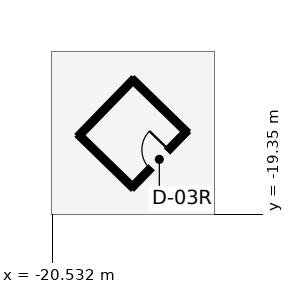
"""IFC4 building model, lengths in metres.
Left out: names, types, materials, properties, quantities, classifications, styles, units other than length and angle.
Written with IfcOpenShell. Run it as: python <this file> out.ifc"""

import sys

from ifc_helpers import new_model, si_unit, direction, frame, frame_2d, origin, place, context, subcontext, project, spatial, rectangle, extrude, element, fill, save


model = new_model("IFC4")
c1 = context("Model", 3, precision=1e-05, world=origin(), true_north=direction((0.0, 1.0)))
c2 = subcontext(c1, "Body", "Model", "MODEL_VIEW")
j1 = project(units=[si_unit("LENGTHUNIT", "METRE"), si_unit("PLANEANGLEUNIT", "RADIAN")], contexts=[c1])
p1 = place(None, origin())
s1 = spatial("IfcSite", under=j1, at=p1, CompositionType="ELEMENT")
p2 = place(p1, origin())
s2 = spatial("IfcBuilding", under=s1, at=p2, CompositionType="ELEMENT")
p3 = place(p2, frame((0.0, 0.0, 152.7)))
s3 = spatial("IfcBuildingStorey", under=s2, at=p3, CompositionType="ELEMENT", Elevation=152.7)
p4 = place(p3, frame((35.296, -9.873, 0.0), z_axis=(0.0, 0.0, 1.0), x_axis=(-0.933580612554, -0.35836746485, 0.0)))
e1 = element("IfcWall", 1, at=p4, inside=s3, PredefinedType="STANDARD", context=c2, shape_type="SweptSolid", body=[
    extrude(rectangle(XDim=58.828, YDim=0.3, at=frame_2d((29.414, 0.0))), origin(), (0.0, 0.0, 1.0), 3.85),
])
p5 = place(p4, frame((6.314, 0.0, 0.85)))
e2 = element("IfcOpeningElement", 2, at=p5, cuts=e1, PredefinedType="OPENING", context=c2, shape_type="SweptSolid", body=[
    extrude(rectangle(XDim=1.4, YDim=2.2, at=frame_2d((0.7, 1.1))), frame((0.0, 0.16, 0.0), z_axis=(0.0, -1.0, 0.0), x_axis=(1.0, 0.0, 0.0)), (0.0, 0.0, 1.0), 0.32),
])
p6 = place(p4, frame((11.914, 0.0, 0.85)))
e3 = element("IfcOpeningElement", 3, at=p6, cuts=e1, PredefinedType="OPENING", context=c2, shape_type="SweptSolid", body=[
    extrude(rectangle(XDim=1.4, YDim=2.2, at=frame_2d((0.7, 1.1))), frame((0.0, 0.16, 0.0), z_axis=(0.0, -1.0, 0.0), x_axis=(1.0, 0.0, 0.0)), (0.0, 0.0, 1.0), 0.32),
])
p7 = place(p4, frame((23.114, 0.0, 0.85)))
e4 = element("IfcOpeningElement", 4, at=p7, cuts=e1, PredefinedType="OPENING", context=c2, shape_type="SweptSolid", body=[
    extrude(rectangle(XDim=1.4, YDim=2.2, at=frame_2d((0.7, 1.1))), frame((0.0, 0.16, 0.0), z_axis=(0.0, -1.0, 0.0), x_axis=(1.0, 0.0, 0.0)), (0.0, 0.0, 1.0), 0.32),
])
p8 = place(p4, frame((28.714, 0.0, 0.85)))
e5 = element("IfcOpeningElement", 5, at=p8, cuts=e1, PredefinedType="OPENING", context=c2, shape_type="SweptSolid", body=[
    extrude(rectangle(XDim=1.4, YDim=2.2, at=frame_2d((0.7, 1.1))), frame((0.0, 0.16, 0.0), z_axis=(0.0, -1.0, 0.0), x_axis=(1.0, 0.0, 0.0)), (0.0, 0.0, 1.0), 0.32),
])
p9 = place(p4, frame((34.314, 0.0, 0.85)))
e6 = element("IfcOpeningElement", 6, at=p9, cuts=e1, PredefinedType="OPENING", context=c2, shape_type="SweptSolid", body=[
    extrude(rectangle(XDim=1.4, YDim=2.2, at=frame_2d((0.7, 1.1))), frame((0.0, 0.16, 0.0), z_axis=(0.0, -1.0, 0.0), x_axis=(1.0, 0.0, 0.0)), (0.0, 0.0, 1.0), 0.32),
])
p10 = place(p4, frame((45.514, 0.0, 0.85)))
e7 = element("IfcOpeningElement", 7, at=p10, cuts=e1, PredefinedType="OPENING", context=c2, shape_type="SweptSolid", body=[
    extrude(rectangle(XDim=1.4, YDim=2.2, at=frame_2d((0.7, 1.1))), frame((0.0, 0.16, 0.0), z_axis=(0.0, -1.0, 0.0), x_axis=(1.0, 0.0, 0.0)), (0.0, 0.0, 1.0), 0.32),
])
p11 = place(p4, frame((51.114, 0.0, 0.85)))
e8 = element("IfcOpeningElement", 8, at=p11, cuts=e1, PredefinedType="OPENING", context=c2, shape_type="SweptSolid", body=[
    extrude(rectangle(XDim=1.4, YDim=2.2, at=frame_2d((0.7, 1.1))), frame((0.0, 0.16, 0.0), z_axis=(0.0, -1.0, 0.0), x_axis=(1.0, 0.0, 0.0)), (0.0, 0.0, 1.0), 0.32),
])
p12 = place(p3, frame((-26.15, -25.64, 0.0), z_axis=(0.0, 0.0, 1.0), x_axis=(0.161975761987, 0.986794736776, 0.0)))
e9 = element("IfcWall", 9, at=p12, inside=s3, PredefinedType="STANDARD", context=c2, shape_type="SweptSolid", body=[
    extrude(rectangle(XDim=58.093, YDim=0.3, at=frame_2d((29.046, 0.0))), origin(), (0.0, 0.0, 1.0), 3.85),
])
p13 = place(p12, frame((28.546, 0.0, 0.0)))
e10 = element("IfcOpeningElement", 10, at=p13, cuts=e9, PredefinedType="OPENING", context=c2, shape_type="SweptSolid", body=[
    extrude(rectangle(XDim=1.0, YDim=2.15, at=frame_2d((0.5, 1.075))), frame((0.0, 0.16, 0.0), z_axis=(0.0, -1.0, 0.0), x_axis=(1.0, 0.0, 0.0)), (0.0, 0.0, 1.0), 0.32),
])
p14 = place(p12, frame((5.947, 0.0, 0.85)))
e11 = element("IfcOpeningElement", 11, at=p14, cuts=e9, PredefinedType="OPENING", context=c2, shape_type="SweptSolid", body=[
    extrude(rectangle(XDim=1.4, YDim=2.2, at=frame_2d((0.7, 1.1))), frame((0.0, 0.16, 0.0), z_axis=(0.0, -1.0, 0.0), x_axis=(1.0, 0.0, 0.0)), (0.0, 0.0, 1.0), 0.32),
])
p15 = place(p12, frame((11.546, 0.0, 0.85)))
e12 = element("IfcOpeningElement", 12, at=p15, cuts=e9, PredefinedType="OPENING", context=c2, shape_type="SweptSolid", body=[
    extrude(rectangle(XDim=1.4, YDim=2.2, at=frame_2d((0.7, 1.1))), frame((0.0, 0.16, 0.0), z_axis=(0.0, -1.0, 0.0), x_axis=(1.0, 0.0, 0.0)), (0.0, 0.0, 1.0), 0.32),
])
p16 = place(p12, frame((22.747, 0.0, 0.85)))
e13 = element("IfcOpeningElement", 13, at=p16, cuts=e9, PredefinedType="OPENING", context=c2, shape_type="SweptSolid", body=[
    extrude(rectangle(XDim=1.4, YDim=2.2, at=frame_2d((0.7, 1.1))), frame((0.0, 0.16, 0.0), z_axis=(0.0, -1.0, 0.0), x_axis=(1.0, 0.0, 0.0)), (0.0, 0.0, 1.0), 0.32),
])
p17 = place(p12, frame((33.947, 0.0, 0.85)))
e14 = element("IfcOpeningElement", 14, at=p17, cuts=e9, PredefinedType="OPENING", context=c2, shape_type="SweptSolid", body=[
    extrude(rectangle(XDim=1.4, YDim=2.2, at=frame_2d((0.7, 1.1))), frame((0.0, 0.16, 0.0), z_axis=(0.0, -1.0, 0.0), x_axis=(1.0, 0.0, 0.0)), (0.0, 0.0, 1.0), 0.32),
])
p18 = place(p12, frame((39.546, 0.0, 0.85)))
e15 = element("IfcOpeningElement", 15, at=p18, cuts=e9, PredefinedType="OPENING", context=c2, shape_type="SweptSolid", body=[
    extrude(rectangle(XDim=1.4, YDim=2.2, at=frame_2d((0.7, 1.1))), frame((0.0, 0.16, 0.0), z_axis=(0.0, -1.0, 0.0), x_axis=(1.0, 0.0, 0.0)), (0.0, 0.0, 1.0), 0.32),
])
p19 = place(p12, frame((45.146, 0.0, 0.85)))
e16 = element("IfcOpeningElement", 16, at=p19, cuts=e9, PredefinedType="OPENING", context=c2, shape_type="SweptSolid", body=[
    extrude(rectangle(XDim=1.4, YDim=2.2, at=frame_2d((0.7, 1.1))), frame((0.0, 0.16, 0.0), z_axis=(0.0, -1.0, 0.0), x_axis=(1.0, 0.0, 0.0)), (0.0, 0.0, 1.0), 0.32),
])
p20 = place(p3, frame((-17.868, -14.925, 0.0), z_axis=(0.0, 0.0, 1.0), x_axis=(-0.697186810053, -0.716889497682, 0.0)))
e17 = element("IfcWall", 17, at=p20, inside=s3, PredefinedType="PARTITIONING", context=c2, shape_type="SweptSolid", body=[
    extrude(rectangle(XDim=2.54, YDim=0.14, at=frame_2d((1.27, 0.0))), origin(), (0.0, 0.0, 1.0), 2.898),
])
p21 = place(p3, frame((-19.639, -16.746, 0.0), z_axis=(0.0, 0.0, 1.0), x_axis=(0.716942134728, -0.697132681382, 0.0)))
e18 = element("IfcWall", 18, at=p21, inside=s3, PredefinedType="PARTITIONING", context=c2, shape_type="SweptSolid", body=[
    extrude(rectangle(XDim=2.44, YDim=0.14, at=frame_2d((1.22, 0.0))), origin(), (0.0, 0.0, 1.0), 3.85),
])
p22 = place(p3, frame((-17.89, -18.447, 0.0), z_axis=(0.0, 0.0, 1.0), x_axis=(0.697137410878, 0.71693753588, 0.0)))
e19 = element("IfcWall", 19, at=p22, inside=s3, PredefinedType="PARTITIONING", context=c2, shape_type="SweptSolid", body=[
    extrude(rectangle(XDim=2.54, YDim=0.14, at=frame_2d((1.27, 0.0))), origin(), (0.0, 0.0, 1.0), 3.85),
])
p23 = place(p22, frame((0.83, 0.0, 0.0)))
e20 = element("IfcOpeningElement", 20, at=p23, cuts=e19, PredefinedType="OPENING", context=c2, shape_type="SweptSolid", body=[
    extrude(rectangle(XDim=0.88, YDim=2.1, at=frame_2d((0.44, 1.05))), frame((0.0, 0.08, 0.0), z_axis=(0.0, -1.0, 0.0), x_axis=(1.0, 0.0, 0.0)), (0.0, 0.0, 1.0), 0.16),
])
p24 = place(p3, frame((-16.119, -16.626, 0.0), z_axis=(0.0, 0.0, 1.0), x_axis=(-0.716893506895, 0.697182687515, 0.0)))
e21 = element("IfcWall", 21, at=p24, inside=s3, PredefinedType="PARTITIONING", context=c2, shape_type="SweptSolid", body=[
    extrude(rectangle(XDim=2.44, YDim=0.14, at=frame_2d((1.22, 0.0))), origin(), (0.0, 0.0, 1.0), 3.85),
])
p25 = place(p23, origin())
e22 = element("IfcDoor", 22, at=p25, inside=s3, OperationType="SINGLE_SWING_RIGHT", PredefinedType="DOOR", context=c2, shape_type="SweptSolid", body=[
    extrude(rectangle(XDim=0.88, YDim=2.1, at=frame_2d((0.44, 1.05))), frame((0.0, 0.025, 0.0), z_axis=(0.0, -1.0, 0.0), x_axis=(1.0, 0.0, 0.0)), (0.0, 0.0, 1.0), 0.05),
])
fill(e20, e22)
save(model, sys.argv[1])
